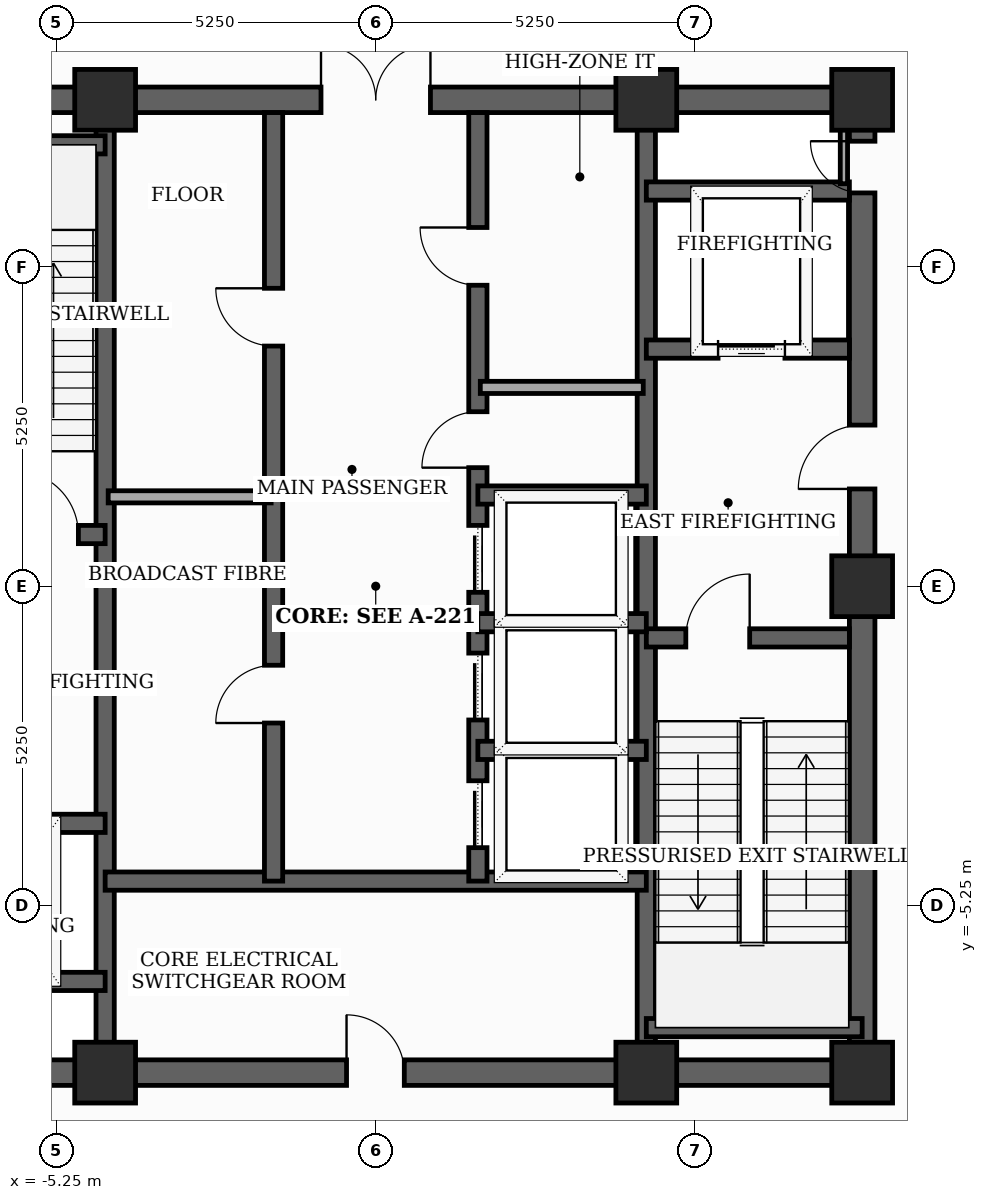
"""IFC4 building model, lengths in metres.
Left out: names, types, materials, properties, quantities, classifications, styles, units other than length and angle.
Written with IfcOpenShell. Run it as: python <this file> out.ifc"""

import sys

from ifc_helpers import new_model, si_unit, direction, frame, frame_2d, origin, origin_2d, place, context, subcontext, project, spatial, rectangle, extrude, element, fill, save


model = new_model("IFC4")
c1 = context("Model", 3, precision=1e-05, world=origin(), true_north=direction((0.0, 1.0)))
c2 = subcontext(c1, "Body", "Model", "MODEL_VIEW")
j1 = project(units=[si_unit("LENGTHUNIT", "METRE"), si_unit("PLANEANGLEUNIT", "RADIAN")], contexts=[c1])
p1 = place(None, origin())
s1 = spatial("IfcSite", under=j1, at=p1, CompositionType="ELEMENT")
p2 = place(p1, origin())
s2 = spatial("IfcBuilding", under=s1, at=p2, CompositionType="ELEMENT")
p3 = place(p2, frame((0.0, 0.0, 278.1)))
s3 = spatial("IfcBuildingStorey", under=s2, at=p3, CompositionType="ELEMENT", Elevation=278.1)
for number, where, z_axis, x_axis in (
    (1, (-4.45, -8.0, 0.0), (0.0, 0.0, 1.0), (1.0, 0.0, 0.0)),
    (2, (4.45, -8.0, 0.0), (0.0, 0.0, 1.0), (1.0, 0.0, 0.0)),
    (3, (8.0, -8.0, 0.0), (0.0, 0.0, 1.0), (1.0, 0.0, 0.0)),
    (4, (8.0, 0.0, 0.0), (0.0, 0.0, 1.0), (1.0, 0.0, 0.0)),
    (5, (8.0, 8.0, 0.0), (0.0, 0.0, 1.0), (1.0, 0.0, 0.0)),
    (6, (4.45, 8.0, 0.0), (0.0, 0.0, 1.0), (1.0, 0.0, 0.0)),
    (7, (-4.45, 8.0, 0.0), (0.0, 0.0, 1.0), (1.0, 0.0, 0.0)),
):
    element("IfcColumn", number, at=place(p3, frame(where, z_axis=z_axis, x_axis=x_axis)), inside=s3, PredefinedType="COLUMN", context=c2, shape_type="SweptSolid", body=[
        extrude(rectangle(XDim=1.0, YDim=1.0, at=origin_2d()), origin(), (0.0, 0.0, 1.0), 5.1),
    ])
for number, where, z_axis, x_axis in (
    (8, (8.454, -25.942, 0.0), (0.0, 0.0, 1.0), (0.309, 0.951, 0.0)),
    (9, (-26.693, 5.65, 0.0), (0.0, 0.0, 1.0), (0.669, -0.743, 0.0)),
):
    element("IfcWall", number, at=place(p3, frame(where, z_axis=z_axis, x_axis=x_axis)), inside=s3, PredefinedType="SOLIDWALL", context=c2, shape_type="SweptSolid", body=[
        extrude(rectangle(XDim=44.12, YDim=0.22, at=frame_2d((22.06, 0.0))), origin(), (0.0, 0.0, 1.0), 4.4),
    ])
p4 = place(p3, frame((8.0, -8.0, 0.0), z_axis=(0.0, 0.0, 1.0), x_axis=(0.0, 1.0, 0.0)))
e10 = element("IfcWall", 10, at=p4, inside=s3, PredefinedType="SHEAR", context=c2, shape_type="SweptSolid", body=[
    extrude(rectangle(XDim=16.0, YDim=0.42, at=frame_2d((8.0, 0.0))), origin(), (0.0, 0.0, 1.0), 4.9),
])
p5 = place(p4, frame((9.6, 0.0, 0.0)))
e11 = element("IfcOpeningElement", 11, at=p5, cuts=e10, PredefinedType="OPENING", context=c2, shape_type="SweptSolid", body=[
    extrude(rectangle(XDim=1.05, YDim=2.15, at=frame_2d((0.525, 1.075))), frame((0.0, 0.22, 0.0), z_axis=(0.0, -1.0, 0.0), x_axis=(1.0, 0.0, 0.0)), (0.0, 0.0, 1.0), 0.44),
])
p6 = place(p4, frame((14.469, 0.0, 0.0)))
e12 = element("IfcOpeningElement", 12, at=p6, cuts=e10, PredefinedType="OPENING", context=c2, shape_type="SweptSolid", body=[
    extrude(rectangle(XDim=0.85, YDim=2.02, at=frame_2d((0.425, 1.01))), frame((0.0, 0.22, 0.0), z_axis=(0.0, -1.0, 0.0), x_axis=(1.0, 0.0, 0.0)), (0.0, 0.0, 1.0), 0.44),
])
p7 = place(p3, frame((-8.0, -8.0, 0.0), z_axis=(0.0, 0.0, 1.0), x_axis=(1.0, 0.0, 0.0)))
e13 = element("IfcWall", 13, at=p7, inside=s3, PredefinedType="SHEAR", context=c2, shape_type="SweptSolid", body=[
    extrude(rectangle(XDim=16.0, YDim=0.42, at=frame_2d((8.0, 0.0))), origin(), (0.0, 0.0, 1.0), 4.9),
])
p8 = place(p7, frame((7.52, 0.0, 0.0)))
e14 = element("IfcOpeningElement", 14, at=p8, cuts=e13, PredefinedType="OPENING", context=c2, shape_type="SweptSolid", body=[
    extrude(rectangle(XDim=0.95, YDim=2.1, at=frame_2d((0.475, 1.05))), frame((0.0, 0.22, 0.0), z_axis=(0.0, -1.0, 0.0), x_axis=(1.0, 0.0, 0.0)), (0.0, 0.0, 1.0), 0.44),
])
p9 = place(p3, frame((-8.0, 8.0, 0.0), z_axis=(0.0, 0.0, 1.0), x_axis=(1.0, 0.0, 0.0)))
e15 = element("IfcWall", 15, at=p9, inside=s3, PredefinedType="SHEAR", context=c2, shape_type="SweptSolid", body=[
    extrude(rectangle(XDim=16.0, YDim=0.42, at=frame_2d((8.0, 0.0))), origin(), (0.0, 0.0, 1.0), 4.9),
])
p10 = place(p9, frame((7.1, 0.0, 0.0)))
e16 = element("IfcOpeningElement", 16, at=p10, cuts=e15, PredefinedType="OPENING", context=c2, shape_type="SweptSolid", body=[
    extrude(rectangle(XDim=1.8, YDim=2.15, at=frame_2d((0.9, 1.075))), frame((0.0, 0.22, 0.0), z_axis=(0.0, -1.0, 0.0), x_axis=(1.0, 0.0, 0.0)), (0.0, 0.0, 1.0), 0.44),
])
for number, where, z_axis, x_axis in (
    (17, (-4.45, -7.79, 0.0), (0.0, 0.0, 1.0), (0.0, 1.0, 0.0)),
    (18, (4.45, -7.79, 0.0), (0.0, 0.0, 1.0), (0.0, 1.0, 0.0)),
):
    element("IfcWall", number, at=place(p3, frame(where, z_axis=z_axis, x_axis=x_axis)), inside=s3, PredefinedType="SHEAR", context=c2, shape_type="SweptSolid", body=[
        extrude(rectangle(XDim=15.58, YDim=0.3, at=frame_2d((7.79, 0.0))), origin(), (0.0, 0.0, 1.0), 4.9),
    ])
p11 = place(p3, frame((-7.79, 0.85, 0.0), z_axis=(0.0, 0.0, 1.0), x_axis=(1.0, 0.0, 0.0)))
e19 = element("IfcWall", 19, at=p11, inside=s3, PredefinedType="SHEAR", context=c2, shape_type="SweptSolid", body=[
    extrude(rectangle(XDim=3.34, YDim=0.3, at=frame_2d((1.67, 0.0))), origin(), (0.0, 0.0, 1.0), 4.9),
])
p12 = place(p11, frame((1.85, 0.0, 0.0)))
e20 = element("IfcOpeningElement", 20, at=p12, cuts=e19, PredefinedType="OPENING", context=c2, shape_type="SweptSolid", body=[
    extrude(rectangle(XDim=1.05, YDim=2.15, at=frame_2d((0.525, 1.075))), frame((0.0, 0.16, 0.0), z_axis=(0.0, -1.0, 0.0), x_axis=(1.0, 0.0, 0.0)), (0.0, 0.0, 1.0), 0.32),
])
p13 = place(p3, frame((-7.79, 7.26, 0.0), z_axis=(0.0, 0.0, 1.0), x_axis=(1.0, 0.0, 0.0)))
e21 = element("IfcWall", 21, at=p13, inside=s3, PredefinedType="SHEAR", context=c2, shape_type="SweptSolid", body=[
    extrude(rectangle(XDim=3.34, YDim=0.3, at=frame_2d((1.67, 0.0))), origin(), (0.0, 0.0, 1.0), 4.9),
])
p14 = place(p3, frame((4.45, -0.85, 0.0), z_axis=(0.0, 0.0, 1.0), x_axis=(1.0, 0.0, 0.0)))
e22 = element("IfcWall", 22, at=p14, inside=s3, PredefinedType="SHEAR", context=c2, shape_type="SweptSolid", body=[
    extrude(rectangle(XDim=3.34, YDim=0.3, at=frame_2d((1.67, 0.0))), origin(), (0.0, 0.0, 1.0), 4.9),
])
p15 = place(p14, frame((0.65, 0.0, 0.0)))
e23 = element("IfcOpeningElement", 23, at=p15, cuts=e22, PredefinedType="OPENING", context=c2, shape_type="SweptSolid", body=[
    extrude(rectangle(XDim=1.05, YDim=2.15, at=frame_2d((0.525, 1.075))), frame((0.0, 0.16, 0.0), z_axis=(0.0, -1.0, 0.0), x_axis=(1.0, 0.0, 0.0)), (0.0, 0.0, 1.0), 0.32),
])
p16 = place(p3, frame((4.45, -7.26, 0.0), z_axis=(0.0, 0.0, 1.0), x_axis=(1.0, 0.0, 0.0)))
e24 = element("IfcWall", 24, at=p16, inside=s3, PredefinedType="SHEAR", context=c2, shape_type="SweptSolid", body=[
    extrude(rectangle(XDim=3.55, YDim=0.3, at=frame_2d((1.775, 0.0))), origin(), (0.0, 0.0, 1.0), 4.9),
])
p17 = place(p3, frame((-7.79, -3.9, 0.0), z_axis=(0.0, 0.0, 1.0), x_axis=(1.0, 0.0, 0.0)))
e25 = element("IfcWall", 25, at=p17, inside=s3, PredefinedType="SHEAR", context=c2, shape_type="SweptSolid", body=[
    extrude(rectangle(XDim=3.34, YDim=0.3, at=frame_2d((1.67, 0.0))), origin(), (0.0, 0.0, 1.0), 4.9),
])
p18 = place(p17, frame((1.27, 0.0, 0.0)))
e26 = element("IfcOpeningElement", 26, at=p18, cuts=e25, PredefinedType="OPENING", context=c2, shape_type="SweptSolid", body=[
    extrude(rectangle(XDim=1.1, YDim=2.1, at=frame_2d((0.55, 1.05))), frame((0.0, 0.16, 0.0), z_axis=(0.0, -1.0, 0.0), x_axis=(1.0, 0.0, 0.0)), (0.0, 0.0, 1.0), 0.32),
])
p19 = place(p3, frame((-7.79, -6.5, 0.0), z_axis=(0.0, 0.0, 1.0), x_axis=(1.0, 0.0, 0.0)))
e27 = element("IfcWall", 27, at=p19, inside=s3, PredefinedType="SHEAR", context=c2, shape_type="SweptSolid", body=[
    extrude(rectangle(XDim=3.34, YDim=0.3, at=frame_2d((1.67, 0.0))), origin(), (0.0, 0.0, 1.0), 4.9),
])
p20 = place(p3, frame((4.45, 3.9, 0.0), z_axis=(0.0, 0.0, 1.0), x_axis=(1.0, 0.0, 0.0)))
e28 = element("IfcWall", 28, at=p20, inside=s3, PredefinedType="SHEAR", context=c2, shape_type="SweptSolid", body=[
    extrude(rectangle(XDim=3.34, YDim=0.3, at=frame_2d((1.67, 0.0))), origin(), (0.0, 0.0, 1.0), 4.9),
])
p21 = place(p20, frame((1.18, 0.0, 0.0)))
e29 = element("IfcOpeningElement", 29, at=p21, cuts=e28, PredefinedType="OPENING", context=c2, shape_type="SweptSolid", body=[
    extrude(rectangle(XDim=1.1, YDim=2.1, at=frame_2d((0.55, 1.05))), frame((0.0, 0.16, 0.0), z_axis=(0.0, -1.0, 0.0), x_axis=(1.0, 0.0, 0.0)), (0.0, 0.0, 1.0), 0.32),
])
p22 = place(p3, frame((4.45, 6.5, 0.0), z_axis=(0.0, 0.0, 1.0), x_axis=(1.0, 0.0, 0.0)))
e30 = element("IfcWall", 30, at=p22, inside=s3, PredefinedType="SHEAR", context=c2, shape_type="SweptSolid", body=[
    extrude(rectangle(XDim=3.34, YDim=0.3, at=frame_2d((1.67, 0.0))), origin(), (0.0, 0.0, 1.0), 4.9),
])
p23 = place(p3, frame((-4.45, -4.85, 0.0), z_axis=(0.0, 0.0, 1.0), x_axis=(1.0, 0.0, 0.0)))
e31 = element("IfcWall", 31, at=p23, inside=s3, PredefinedType="SHEAR", context=c2, shape_type="SweptSolid", body=[
    extrude(rectangle(XDim=8.9, YDim=0.3, at=frame_2d((4.45, 0.0))), origin(), (0.0, 0.0, 1.0), 4.9),
])
p24 = place(p3, frame((-1.68, -4.85, 0.0), z_axis=(0.0, 0.0, 1.0), x_axis=(0.0, 1.0, 0.0)))
e32 = element("IfcWall", 32, at=p24, inside=s3, PredefinedType="SHEAR", context=c2, shape_type="SweptSolid", body=[
    extrude(rectangle(XDim=12.64, YDim=0.3, at=frame_2d((6.32, 0.0))), origin(), (0.0, 0.0, 1.0), 4.9),
])
p25 = place(p24, frame((2.6, 0.0, 0.0)))
e33 = element("IfcOpeningElement", 33, at=p25, cuts=e32, PredefinedType="OPENING", context=c2, shape_type="SweptSolid", body=[
    extrude(rectangle(XDim=0.95, YDim=2.1, at=frame_2d((0.475, 1.05))), frame((0.0, 0.16, 0.0), z_axis=(0.0, -1.0, 0.0), x_axis=(1.0, 0.0, 0.0)), (0.0, 0.0, 1.0), 0.32),
])
p26 = place(p24, frame((8.8, 0.0, 0.0)))
e34 = element("IfcOpeningElement", 34, at=p26, cuts=e32, PredefinedType="OPENING", context=c2, shape_type="SweptSolid", body=[
    extrude(rectangle(XDim=0.95, YDim=2.1, at=frame_2d((0.475, 1.05))), frame((0.0, 0.16, 0.0), z_axis=(0.0, -1.0, 0.0), x_axis=(1.0, 0.0, 0.0)), (0.0, 0.0, 1.0), 0.32),
])
p27 = place(p3, frame((1.68, -4.85, 0.0), z_axis=(0.0, 0.0, 1.0), x_axis=(0.0, 1.0, 0.0)))
e35 = element("IfcWall", 35, at=p27, inside=s3, PredefinedType="SHEAR", context=c2, shape_type="SweptSolid", body=[
    extrude(rectangle(XDim=12.64, YDim=0.3, at=frame_2d((6.32, 0.0))), origin(), (0.0, 0.0, 1.0), 4.9),
])
p28 = place(p27, frame((0.55, 0.0, 0.0)))
e36 = element("IfcOpeningElement", 36, at=p28, cuts=e35, PredefinedType="OPENING", context=c2, shape_type="SweptSolid", body=[
    extrude(rectangle(XDim=1.1, YDim=2.1, at=frame_2d((0.55, 1.05))), frame((0.0, 0.16, 0.0), z_axis=(0.0, -1.0, 0.0), x_axis=(1.0, 0.0, 0.0)), (0.0, 0.0, 1.0), 0.32),
])
p29 = place(p27, frame((2.65, 0.0, 0.0)))
e37 = element("IfcOpeningElement", 37, at=p29, cuts=e35, PredefinedType="OPENING", context=c2, shape_type="SweptSolid", body=[
    extrude(rectangle(XDim=1.1, YDim=2.1, at=frame_2d((0.55, 1.05))), frame((0.0, 0.16, 0.0), z_axis=(0.0, -1.0, 0.0), x_axis=(1.0, 0.0, 0.0)), (0.0, 0.0, 1.0), 0.32),
])
p30 = place(p27, frame((4.75, 0.0, 0.0)))
e38 = element("IfcOpeningElement", 38, at=p30, cuts=e35, PredefinedType="OPENING", context=c2, shape_type="SweptSolid", body=[
    extrude(rectangle(XDim=1.1, YDim=2.1, at=frame_2d((0.55, 1.05))), frame((0.0, 0.16, 0.0), z_axis=(0.0, -1.0, 0.0), x_axis=(1.0, 0.0, 0.0)), (0.0, 0.0, 1.0), 0.32),
])
p31 = place(p27, frame((6.8, 0.0, 0.0)))
e39 = element("IfcOpeningElement", 39, at=p31, cuts=e35, PredefinedType="OPENING", context=c2, shape_type="SweptSolid", body=[
    extrude(rectangle(XDim=0.92, YDim=2.1, at=frame_2d((0.46, 1.05))), frame((0.0, 0.16, 0.0), z_axis=(0.0, -1.0, 0.0), x_axis=(1.0, 0.0, 0.0)), (0.0, 0.0, 1.0), 0.32),
])
p32 = place(p27, frame((9.8, 0.0, 0.0)))
e40 = element("IfcOpeningElement", 40, at=p32, cuts=e35, PredefinedType="OPENING", context=c2, shape_type="SweptSolid", body=[
    extrude(rectangle(XDim=0.95, YDim=2.1, at=frame_2d((0.475, 1.05))), frame((0.0, 0.16, 0.0), z_axis=(0.0, -1.0, 0.0), x_axis=(1.0, 0.0, 0.0)), (0.0, 0.0, 1.0), 0.32),
])
for number, where, z_axis, x_axis in (
    (41, (1.68, 1.5, 0.0), (0.0, 0.0, 1.0), (1.0, 0.0, 0.0)),
    (42, (1.68, -2.7, 0.0), (0.0, 0.0, 1.0), (1.0, 0.0, 0.0)),
    (43, (1.68, -0.6, 0.0), (0.0, 0.0, 1.0), (1.0, 0.0, 0.0)),
):
    element("IfcWall", number, at=place(p3, frame(where, z_axis=z_axis, x_axis=x_axis)), inside=s3, PredefinedType="SHEAR", context=c2, shape_type="SweptSolid", body=[
        extrude(rectangle(XDim=2.77, YDim=0.3, at=frame_2d((1.385, 0.0))), origin(), (0.0, 0.0, 1.0), 4.9),
    ])
for number, where, z_axis, x_axis in (
    (44, (-4.4, 1.47, 0.0), (0.0, 0.0, 1.0), (1.0, 0.0, 0.0)),
    (45, (1.72, 3.27, 0.0), (0.0, 0.0, 1.0), (1.0, 0.0, 0.0)),
):
    element("IfcWall", number, at=place(p3, frame(where, z_axis=z_axis, x_axis=x_axis)), inside=s3, PredefinedType="SOLIDWALL", context=c2, shape_type="SweptSolid", body=[
        extrude(rectangle(XDim=2.68, YDim=0.2, at=frame_2d((1.34, 0.0))), origin(), (0.0, 0.0, 1.0), 4.9),
    ])
for number, where, z_axis, x_axis in (
    (46, (3.67, -26.129, 0.0), (0.0, 0.0, 1.0), (-0.669, 0.743, 0.0)),
    (47, (20.793, 16.242, 0.0), (0.0, 0.0, 1.0), (-0.309, -0.951, 0.0)),
):
    element("IfcWall", number, at=place(p3, frame(where, z_axis=z_axis, x_axis=x_axis)), inside=s3, PredefinedType="SOLIDWALL", context=c2, shape_type="SweptSolid", body=[
        extrude(rectangle(XDim=43.746, YDim=0.16, at=frame_2d((21.873, 0.0))), origin(), (0.0, 0.0, 1.0), 3.485),
    ])
p33 = place(p3, frame((7.7, 6.62, 0.0), z_axis=(0.0, 0.0, 1.0), x_axis=(0.0, 1.0, 0.0)))
e48 = element("IfcWall", 48, at=p33, inside=s3, PredefinedType="PLUMBINGWALL", context=c2, shape_type="SweptSolid", body=[
    extrude(rectangle(XDim=1.13, YDim=0.12, at=frame_2d((0.565, 0.0))), origin(), (0.0, 0.0, 1.0), 4.9),
])
p34 = place(p5, origin())
e49 = element("IfcDoor", 49, at=p34, inside=s3, OperationType="SINGLE_SWING_LEFT", PredefinedType="DOOR", context=c2, shape_type="SweptSolid", body=[
    extrude(rectangle(XDim=1.05, YDim=2.15, at=frame_2d((0.525, 1.075))), frame((0.0, 0.025, 0.0), z_axis=(0.0, -1.0, 0.0), x_axis=(1.0, 0.0, 0.0)), (0.0, 0.0, 1.0), 0.05),
])
fill(e11, e49)
p35 = place(p6, origin())
e50 = element("IfcDoor", 50, at=p35, inside=s3, OperationType="SINGLE_SWING_RIGHT", PredefinedType="TRAPDOOR", context=c2, shape_type="SweptSolid", body=[
    extrude(rectangle(XDim=0.85, YDim=2.02, at=frame_2d((0.425, 1.01))), frame((0.0, 0.025, 0.0), z_axis=(0.0, -1.0, 0.0), x_axis=(1.0, 0.0, 0.0)), (0.0, 0.0, 1.0), 0.05),
])
fill(e12, e50)
p36 = place(p8, origin())
e51 = element("IfcDoor", 51, at=p36, inside=s3, OperationType="SINGLE_SWING_LEFT", PredefinedType="DOOR", context=c2, shape_type="SweptSolid", body=[
    extrude(rectangle(XDim=0.95, YDim=2.1, at=frame_2d((0.475, 1.05))), frame((0.0, 0.025, 0.0), z_axis=(0.0, -1.0, 0.0), x_axis=(1.0, 0.0, 0.0)), (0.0, 0.0, 1.0), 0.05),
])
fill(e14, e51)
p37 = place(p10, origin())
e52 = element("IfcDoor", 52, at=p37, inside=s3, OperationType="DOUBLE_DOOR_SINGLE_SWING", PredefinedType="DOOR", context=c2, shape_type="SweptSolid", body=[
    extrude(rectangle(XDim=1.8, YDim=2.15, at=frame_2d((0.9, 1.075))), frame((0.0, 0.025, 0.0), z_axis=(0.0, -1.0, 0.0), x_axis=(1.0, 0.0, 0.0)), (0.0, 0.0, 1.0), 0.05),
])
fill(e16, e52)
p38 = place(p12, origin())
e53 = element("IfcDoor", 53, at=p38, inside=s3, OperationType="SINGLE_SWING_LEFT", PredefinedType="DOOR", context=c2, shape_type="SweptSolid", body=[
    extrude(rectangle(XDim=1.05, YDim=2.15, at=frame_2d((0.525, 1.075))), frame((0.0, 0.025, 0.0), z_axis=(0.0, -1.0, 0.0), x_axis=(1.0, 0.0, 0.0)), (0.0, 0.0, 1.0), 0.05),
])
fill(e20, e53)
p39 = place(p15, origin())
e54 = element("IfcDoor", 54, at=p39, inside=s3, OperationType="SINGLE_SWING_RIGHT", PredefinedType="DOOR", context=c2, shape_type="SweptSolid", body=[
    extrude(rectangle(XDim=1.05, YDim=2.15, at=frame_2d((0.525, 1.075))), frame((0.0, 0.025, 0.0), z_axis=(0.0, -1.0, 0.0), x_axis=(1.0, 0.0, 0.0)), (0.0, 0.0, 1.0), 0.05),
])
fill(e23, e54)
p40 = place(p21, origin())
e55 = element("IfcDoor", 55, at=p40, inside=s3, OperationType="SLIDING_TO_LEFT", PredefinedType="DOOR", context=c2, shape_type="SweptSolid", body=[
    extrude(rectangle(XDim=1.1, YDim=2.1, at=frame_2d((0.55, 1.05))), frame((0.0, 0.025, 0.0), z_axis=(0.0, -1.0, 0.0), x_axis=(1.0, 0.0, 0.0)), (0.0, 0.0, 1.0), 0.05),
])
fill(e29, e55)
p41 = place(p25, origin())
e56 = element("IfcDoor", 56, at=p41, inside=s3, OperationType="SINGLE_SWING_LEFT", PredefinedType="DOOR", context=c2, shape_type="SweptSolid", body=[
    extrude(rectangle(XDim=0.95, YDim=2.1, at=frame_2d((0.475, 1.05))), frame((0.0, 0.025, 0.0), z_axis=(0.0, -1.0, 0.0), x_axis=(1.0, 0.0, 0.0)), (0.0, 0.0, 1.0), 0.05),
])
fill(e33, e56)
p42 = place(p26, origin())
e57 = element("IfcDoor", 57, at=p42, inside=s3, OperationType="SINGLE_SWING_RIGHT", PredefinedType="DOOR", context=c2, shape_type="SweptSolid", body=[
    extrude(rectangle(XDim=0.95, YDim=2.1, at=frame_2d((0.475, 1.05))), frame((0.0, 0.025, 0.0), z_axis=(0.0, -1.0, 0.0), x_axis=(1.0, 0.0, 0.0)), (0.0, 0.0, 1.0), 0.05),
])
fill(e34, e57)
p43 = place(p28, origin())
e58 = element("IfcDoor", 58, at=p43, inside=s3, OperationType="SLIDING_TO_LEFT", PredefinedType="DOOR", context=c2, shape_type="SweptSolid", body=[
    extrude(rectangle(XDim=1.1, YDim=2.1, at=frame_2d((0.55, 1.05))), frame((0.0, 0.025, 0.0), z_axis=(0.0, -1.0, 0.0), x_axis=(1.0, 0.0, 0.0)), (0.0, 0.0, 1.0), 0.05),
])
fill(e36, e58)
p44 = place(p29, origin())
e59 = element("IfcDoor", 59, at=p44, inside=s3, OperationType="SLIDING_TO_LEFT", PredefinedType="DOOR", context=c2, shape_type="SweptSolid", body=[
    extrude(rectangle(XDim=1.1, YDim=2.1, at=frame_2d((0.55, 1.05))), frame((0.0, 0.025, 0.0), z_axis=(0.0, -1.0, 0.0), x_axis=(1.0, 0.0, 0.0)), (0.0, 0.0, 1.0), 0.05),
])
fill(e37, e59)
p45 = place(p30, origin())
e60 = element("IfcDoor", 60, at=p45, inside=s3, OperationType="SLIDING_TO_LEFT", PredefinedType="DOOR", context=c2, shape_type="SweptSolid", body=[
    extrude(rectangle(XDim=1.1, YDim=2.1, at=frame_2d((0.55, 1.05))), frame((0.0, 0.025, 0.0), z_axis=(0.0, -1.0, 0.0), x_axis=(1.0, 0.0, 0.0)), (0.0, 0.0, 1.0), 0.05),
])
fill(e38, e60)
p46 = place(p31, origin())
e61 = element("IfcDoor", 61, at=p46, inside=s3, OperationType="SINGLE_SWING_LEFT", PredefinedType="DOOR", context=c2, shape_type="SweptSolid", body=[
    extrude(rectangle(XDim=0.92, YDim=2.1, at=frame_2d((0.46, 1.05))), frame((0.0, 0.025, 0.0), z_axis=(0.0, -1.0, 0.0), x_axis=(1.0, 0.0, 0.0)), (0.0, 0.0, 1.0), 0.05),
])
fill(e39, e61)
p47 = place(p32, origin())
e62 = element("IfcDoor", 62, at=p47, inside=s3, OperationType="SINGLE_SWING_RIGHT", PredefinedType="DOOR", context=c2, shape_type="SweptSolid", body=[
    extrude(rectangle(XDim=0.95, YDim=2.1, at=frame_2d((0.475, 1.05))), frame((0.0, 0.025, 0.0), z_axis=(0.0, -1.0, 0.0), x_axis=(1.0, 0.0, 0.0)), (0.0, 0.0, 1.0), 0.05),
])
fill(e40, e62)
save(model, sys.argv[1])
